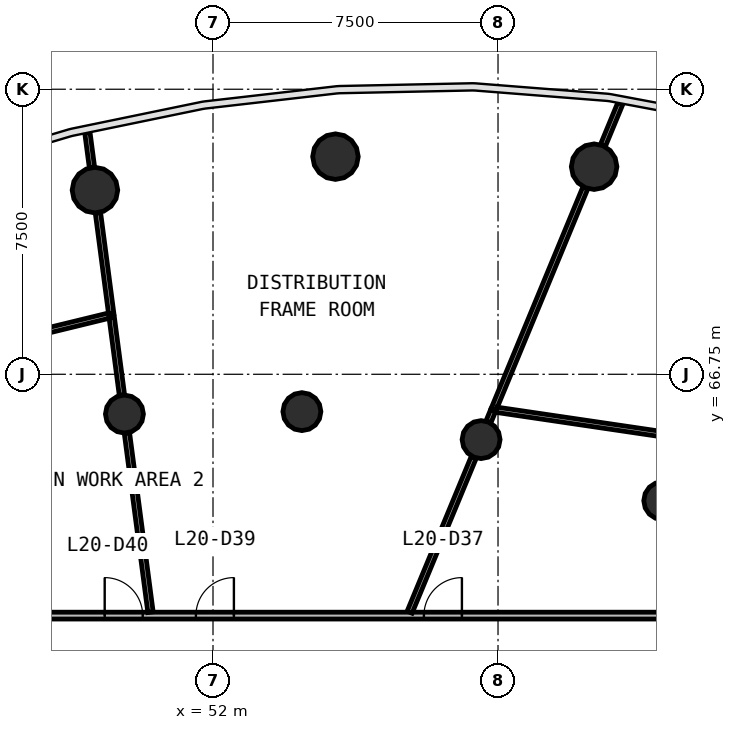
"""IFC4 building model, lengths in metres.
Left out: names, types, materials, properties, quantities, classifications, styles, units other than length and angle.
Written with IfcOpenShell. Run it as: python <this file> out.ifc"""

import sys

from ifc_helpers import new_model, si_unit, direction, frame, frame_2d, origin, origin_2d, place, context, subcontext, project, spatial, rectangle, circle, extrude, source, transform, mapped, element, fill, save


model = new_model("IFC4")
c1 = context("Model", 3, precision=1e-05, world=origin(), true_north=direction((0.0, 1.0)))
c2 = subcontext(c1, "Body", "Model", "MODEL_VIEW")
j1 = project(units=[si_unit("LENGTHUNIT", "METRE"), si_unit("PLANEANGLEUNIT", "RADIAN")], contexts=[c1])
p1 = place(None, origin())
s1 = spatial("IfcSite", under=j1, at=p1, CompositionType="ELEMENT")
p2 = place(p1, origin())
s2 = spatial("IfcBuilding", under=s1, at=p2, CompositionType="ELEMENT")
p3 = place(p2, frame((0.0, 0.0, 88.0)))
s3 = spatial("IfcBuildingStorey", under=s2, at=p3, CompositionType="ELEMENT", Elevation=88.0)
m1 = source(origin(), c2, "Body", "SweptSolid", [
    extrude(circle(Radius=0.6, at=origin_2d()), origin(), (0.0, 0.0, 1.0), 4.1),
])
for number, where, z_axis, x_axis in (
    (1, (62.029, 72.212, 0.0), (0.0, 0.0, 1.0), (1.0, 0.0, 0.0)),
    (2, (55.222, 72.477, 0.0), (0.0, 0.0, 1.0), (1.0, 0.0, 0.0)),
    (3, (48.894, 71.595, 0.0), (0.0, 0.0, 1.0), (1.0, 0.0, 0.0)),
):
    element("IfcColumn", number, at=place(p3, frame(where, z_axis=z_axis, x_axis=x_axis)), inside=s3, PredefinedType="COLUMN", context=c2, shape_type="MappedRepresentation", body=[
        mapped(m1, transform((0.0, 0.0, 0.0), scale=1.0)),
    ])
m2 = source(origin(), c2, "Body", "SweptSolid", [
    extrude(circle(Radius=0.5, at=origin_2d()), origin(), (0.0, 0.0, 1.0), 4.1),
])
for number, where, z_axis, x_axis in (
    (4, (63.835, 63.424, 0.0), (0.0, 0.0, 1.0), (1.0, 0.0, 0.0)),
    (5, (59.055, 65.031, 0.0), (0.0, 0.0, 1.0), (1.0, 0.0, 0.0)),
    (6, (54.339, 65.767, 0.0), (0.0, 0.0, 1.0), (1.0, 0.0, 0.0)),
    (7, (49.669, 65.703, 0.0), (0.0, 0.0, 1.0), (1.0, 0.0, 0.0)),
):
    element("IfcColumn", number, at=place(p3, frame(where, z_axis=z_axis, x_axis=x_axis)), inside=s3, PredefinedType="COLUMN", context=c2, shape_type="MappedRepresentation", body=[
        mapped(m2, transform((0.0, 0.0, 0.0), scale=1.0)),
    ])
p4 = place(p3, frame((36.6, 60.4, 0.0), z_axis=(0.0, 0.0, 1.0), x_axis=(1.0, 0.0, 0.0)))
e8 = element("IfcWall", 8, at=p4, inside=s3, PredefinedType="PARTITIONING", context=c2, shape_type="SweptSolid", body=[
    extrude(rectangle(XDim=30.8, YDim=0.18, at=frame_2d((15.4, 0.0))), origin(), (0.0, 0.0, 1.0), 2.9),
])
p5 = place(p4, frame((20.95, 0.0, 0.0)))
e9 = element("IfcOpeningElement", 9, at=p5, cuts=e8, PredefinedType="OPENING", context=c2, shape_type="SweptSolid", body=[
    extrude(rectangle(XDim=1.0, YDim=2.1, at=frame_2d((0.5, 1.05))), frame((0.0, 0.1, 0.0), z_axis=(0.0, -1.0, 0.0), x_axis=(1.0, 0.0, 0.0)), (0.0, 0.0, 1.0), 0.2),
])
p6 = place(p4, frame((14.95, 0.0, 0.0)))
e10 = element("IfcOpeningElement", 10, at=p6, cuts=e8, PredefinedType="OPENING", context=c2, shape_type="SweptSolid", body=[
    extrude(rectangle(XDim=1.0, YDim=2.1, at=frame_2d((0.5, 1.05))), frame((0.0, 0.1, 0.0), z_axis=(0.0, -1.0, 0.0), x_axis=(1.0, 0.0, 0.0)), (0.0, 0.0, 1.0), 0.2),
])
p7 = place(p4, frame((12.55, 0.0, 0.0)))
e11 = element("IfcOpeningElement", 11, at=p7, cuts=e8, PredefinedType="OPENING", context=c2, shape_type="SweptSolid", body=[
    extrude(rectangle(XDim=1.0, YDim=2.1, at=frame_2d((0.5, 1.05))), frame((0.0, 0.1, 0.0), z_axis=(0.0, -1.0, 0.0), x_axis=(1.0, 0.0, 0.0)), (0.0, 0.0, 1.0), 0.2),
])
p8 = place(p3, frame((59.385, 65.827, 0.0), z_axis=(0.0, 0.0, 1.0), x_axis=(0.382670932917, 0.923884709853, 0.0)))
e12 = element("IfcWall", 12, at=p8, inside=s3, PredefinedType="PARTITIONING", context=c2, shape_type="SweptSolid", body=[
    extrude(rectangle(XDim=6.306, YDim=0.14, at=frame_2d((3.153, 0.0))), origin(), (0.0, 0.0, 1.0), 2.9),
])
p9 = place(p3, frame((65.01, 64.998, 0.0), z_axis=(0.0, 0.0, 1.0), x_axis=(-0.989300140494, 0.145894592148, 0.0)))
e13 = element("IfcWall", 13, at=p9, inside=s3, PredefinedType="PARTITIONING", context=c2, shape_type="SweptSolid", body=[
    extrude(rectangle(XDim=5.614, YDim=0.14, at=frame_2d((2.807, 0.0))), origin(), (0.0, 0.0, 1.0), 2.9),
])
p10 = place(p3, frame((44.143, 67.046, 0.0), z_axis=(0.0, 0.0, 1.0), x_axis=(0.971565543157, 0.236770765404, 0.0)))
e14 = element("IfcWall", 14, at=p10, inside=s3, PredefinedType="PARTITIONING", context=c2, shape_type="SweptSolid", body=[
    extrude(rectangle(XDim=5.335, YDim=0.14, at=frame_2d((2.667, 0.0))), origin(), (0.0, 0.0, 1.0), 2.9),
])
p11 = place(p10, frame((2.085, 0.0, 0.0)))
e15 = element("IfcOpeningElement", 15, at=p11, cuts=e14, PredefinedType="OPENING", context=c2, shape_type="SweptSolid", body=[
    extrude(rectangle(XDim=1.0, YDim=2.1, at=frame_2d((0.5, 1.05))), frame((0.0, 0.08, 0.0), z_axis=(0.0, -1.0, 0.0), x_axis=(1.0, 0.0, 0.0)), (0.0, 0.0, 1.0), 0.16),
])
p12 = place(p3, frame((50.356, 60.49, 0.0), z_axis=(0.0, 0.0, 1.0), x_axis=(-0.130548834981, 0.991441880135, 0.0)))
e16 = element("IfcWall", 16, at=p12, inside=s3, PredefinedType="PARTITIONING", context=c2, shape_type="SweptSolid", body=[
    extrude(rectangle(XDim=4.754, YDim=0.14, at=frame_2d((2.377, 0.0))), origin(), (0.0, 0.0, 1.0), 2.9),
])
p13 = place(p3, frame((57.174, 60.49, 0.0), z_axis=(0.0, 0.0, 1.0), x_axis=(0.382672831764, 0.923883923353, 0.0)))
e17 = element("IfcWall", 17, at=p13, inside=s3, PredefinedType="PARTITIONING", context=c2, shape_type="SweptSolid", body=[
    extrude(rectangle(XDim=4.41, YDim=0.14, at=frame_2d((2.205, 0.0))), origin(), (0.0, 0.0, 1.0), 2.9),
])
p14 = place(p3, frame((49.322, 68.339, 0.0), z_axis=(0.0, 0.0, 1.0), x_axis=(-0.130558210358, 0.99144064558, 0.0)))
e18 = element("IfcWall", 18, at=p14, inside=s3, PredefinedType="PARTITIONING", context=c2, shape_type="SweptSolid", body=[
    extrude(rectangle(XDim=2.68, YDim=0.14, at=frame_2d((1.34, 0.0))), origin(), (0.0, 0.0, 1.0), 2.9),
])
p15 = place(p3, frame((49.604, 66.203, 0.0), z_axis=(0.0, 0.0, 1.0), x_axis=(-0.130512933025, 0.99144660689, 0.0)))
e19 = element("IfcWall", 19, at=p15, inside=s3, PredefinedType="PARTITIONING", context=c2, shape_type="SweptSolid", body=[
    extrude(rectangle(XDim=2.054, YDim=0.14, at=frame_2d((1.027, 0.0))), origin(), (0.0, 0.0, 1.0), 2.9),
])
p16 = place(p3, frame((62.26, 72.771, 0.0), z_axis=(0.0, 0.0, 1.0), x_axis=(0.382680855588, 0.923880599843, 0.0)))
e20 = element("IfcWall", 20, at=p16, inside=s3, PredefinedType="PARTITIONING", context=c2, shape_type="SweptSolid", body=[
    extrude(rectangle(XDim=1.201, YDim=0.14, at=frame_2d((0.601, 0.0))), origin(), (0.0, 0.0, 1.0), 2.9),
])
p17 = place(p3, frame((48.815, 72.195, 0.0), z_axis=(0.0, 0.0, 1.0), x_axis=(-0.130578341009, 0.99143799446, 0.0)))
e21 = element("IfcWall", 21, at=p17, inside=s3, PredefinedType="PARTITIONING", context=c2, shape_type="SweptSolid", body=[
    extrude(rectangle(XDim=0.918, YDim=0.14, at=frame_2d((0.459, 0.0))), origin(), (0.0, 0.0, 1.0), 2.9),
])
p18 = place(p3, frame((59.248, 65.498, 0.0), z_axis=(0.0, 0.0, 1.0), x_axis=(0.382439756991, 0.923980428512, 0.0)))
e22 = element("IfcWall", 22, at=p18, inside=s3, PredefinedType="PARTITIONING", context=c2, shape_type="SweptSolid", body=[
    extrude(rectangle(XDim=0.327, YDim=0.14, at=frame_2d((0.164, 0.0))), origin(), (0.0, 0.0, 1.0), 2.9),
])
m3 = source(origin(), c2, "Body", "SweptSolid", [
    extrude(rectangle(XDim=1.0, YDim=2.1, at=frame_2d((0.5, 1.05))), frame((0.0, 0.025, 0.0), z_axis=(0.0, -1.0, 0.0), x_axis=(1.0, 0.0, 0.0)), (0.0, 0.0, 1.0), 0.05),
])
p19 = place(p5, origin())
e23 = element("IfcDoor", 23, at=p19, inside=s3, OperationType="SINGLE_SWING_RIGHT", PredefinedType="DOOR", context=c2, shape_type="MappedRepresentation", body=[
    mapped(m3, transform((0.0, 0.0, 0.0), scale=1.0)),
])
fill(e9, e23)
p20 = place(p6, origin())
e24 = element("IfcDoor", 24, at=p20, inside=s3, OperationType="SINGLE_SWING_RIGHT", PredefinedType="DOOR", context=c2, shape_type="MappedRepresentation", body=[
    mapped(m3, transform((0.0, 0.0, 0.0), scale=1.0)),
])
fill(e10, e24)
p21 = place(p7, origin())
e25 = element("IfcDoor", 25, at=p21, inside=s3, OperationType="SINGLE_SWING_LEFT", PredefinedType="DOOR", context=c2, shape_type="MappedRepresentation", body=[
    mapped(m3, transform((0.0, 0.0, 0.0), scale=1.0)),
])
fill(e11, e25)
save(model, sys.argv[1])
